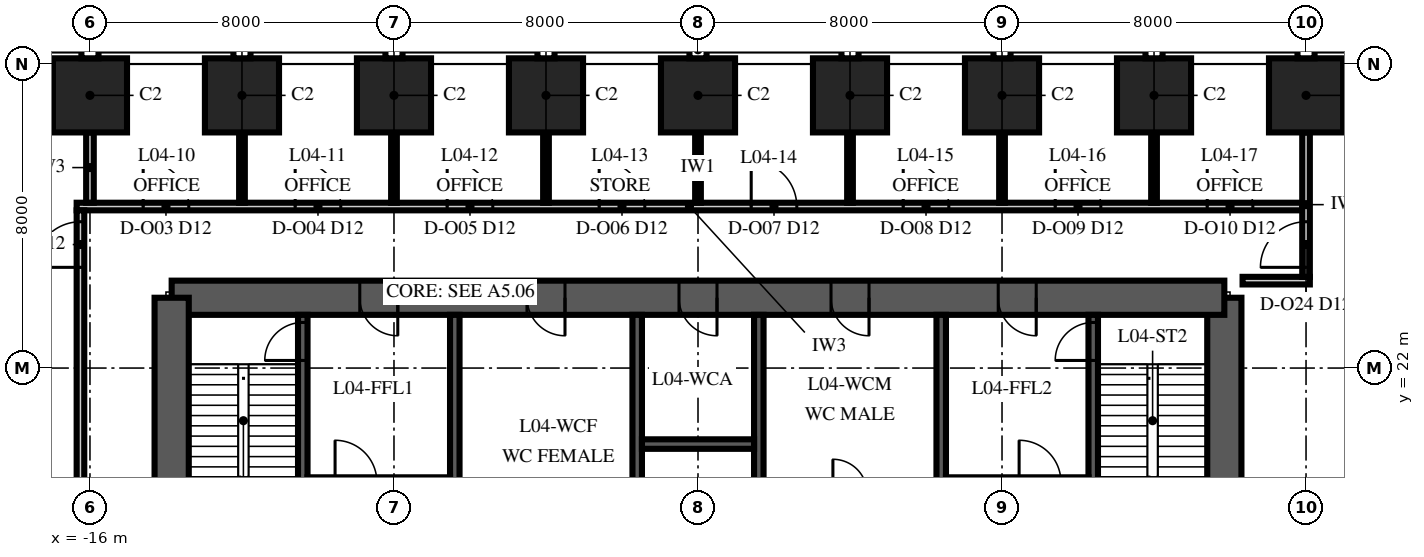
"""IFC4 building model, lengths in metres.
Left out: names, types, materials, properties, quantities, classifications, styles, units other than length and angle.
Written with IfcOpenShell. Run it as: python <this file> out.ifc"""

import sys

from ifc_helpers import new_model, si_unit, direction, frame, frame_2d, origin, origin_2d, place, context, subcontext, project, spatial, polyline, rectangle, outline, extrude, element, fill, save


model = new_model("IFC4")
c1 = context("Model", 3, precision=1e-05, world=origin(), true_north=direction((0.0, 1.0)))
c2 = subcontext(c1, "Body", "Model", "MODEL_VIEW")
j1 = project(units=[si_unit("LENGTHUNIT", "METRE"), si_unit("PLANEANGLEUNIT", "RADIAN")], contexts=[c1])
p1 = place(None, origin())
s1 = spatial("IfcSite", under=j1, at=p1, CompositionType="ELEMENT")
p2 = place(p1, origin())
s2 = spatial("IfcBuilding", under=s1, at=p2, CompositionType="ELEMENT")
p3 = place(p2, frame((0.0, 0.0, 28.0)))
s3 = spatial("IfcBuildingStorey", under=s2, at=p3, CompositionType="ELEMENT", Elevation=28.0)
for number, where, z_axis, x_axis in (
    (1, (16.0, 29.175, 0.0), (0.0, 0.0, 1.0), (-1.0, 0.0, 0.0)),
    (2, (12.0, 29.175, 0.0), (0.0, 0.0, 1.0), (-1.0, 0.0, 0.0)),
    (3, (8.0, 29.175, 0.0), (0.0, 0.0, 1.0), (-1.0, 0.0, 0.0)),
    (4, (4.0, 29.175, 0.0), (0.0, 0.0, 1.0), (-1.0, 0.0, 0.0)),
    (5, (0.0, 29.175, 0.0), (0.0, 0.0, 1.0), (-1.0, 0.0, 0.0)),
    (6, (-4.0, 29.175, 0.0), (0.0, 0.0, 1.0), (-1.0, 0.0, 0.0)),
    (7, (-8.0, 29.175, 0.0), (0.0, 0.0, 1.0), (-1.0, 0.0, 0.0)),
    (8, (-12.0, 29.175, 0.0), (0.0, 0.0, 1.0), (-1.0, 0.0, 0.0)),
    (9, (-16.0, 29.175, 0.0), (0.0, 0.0, 1.0), (-1.0, 0.0, 0.0)),
):
    element("IfcColumn", number, at=place(p3, frame(where, z_axis=z_axis, x_axis=x_axis)), inside=s3, PredefinedType="COLUMN", context=c2, shape_type="SweptSolid", body=[
        extrude(rectangle(XDim=1.95, YDim=1.95, at=origin_2d()), origin(), (0.0, 0.0, 1.0), 4.0),
    ])
p4 = place(p3, frame((13.85, 6.15, 0.0), z_axis=(0.0, 0.0, 1.0), x_axis=(0.0, 1.0, 0.0)))
e10 = element("IfcWall", 10, at=p4, inside=s3, PredefinedType="SHEAR", context=c2, shape_type="SweptSolid", body=[
    extrude(outline(polyline([(0.0, -0.45), (17.7, -0.45), (17.7, 0.0), (17.25, 0.0), (17.25, 0.45), (0.45, 0.45), (0.45, 0.0), (0.0, 0.0), (0.0, -0.45)])), origin(), (0.0, 0.0, 1.0), 4.0),
])
p5 = place(p4, frame((4.15, 0.0, 0.0)))
e11 = element("IfcOpeningElement", 11, at=p5, cuts=e10, PredefinedType="OPENING", context=c2, shape_type="SweptSolid", body=[
    extrude(rectangle(XDim=1.8, YDim=2.4, at=frame_2d((0.9, 1.2))), frame((0.0, 0.465, 0.0), z_axis=(0.0, -1.0, 0.0), x_axis=(1.0, 0.0, 0.0)), (0.0, 0.0, 1.0), 0.93),
])
p6 = place(p3, frame((13.85, 23.85, 0.0), z_axis=(0.0, 0.0, 1.0), x_axis=(-1.0, 0.0, 0.0)))
e12 = element("IfcWall", 12, at=p6, inside=s3, PredefinedType="SHEAR", context=c2, shape_type="SweptSolid", body=[
    extrude(rectangle(XDim=27.7, YDim=0.9, at=frame_2d((13.85, 0.0))), origin(), (0.0, 0.0, 1.0), 4.0),
])
p7 = place(p6, frame((21.75, 0.0, 0.0)))
e13 = element("IfcOpeningElement", 13, at=p7, cuts=e12, PredefinedType="OPENING", context=c2, shape_type="SweptSolid", body=[
    extrude(rectangle(XDim=1.0, YDim=2.1, at=frame_2d((0.5, 1.05))), frame((0.0, 0.465, 0.0), z_axis=(0.0, -1.0, 0.0), x_axis=(1.0, 0.0, 0.0)), (0.0, 0.0, 1.0), 0.93),
])
p8 = place(p6, frame((4.95, 0.0, 0.0)))
e14 = element("IfcOpeningElement", 14, at=p8, cuts=e12, PredefinedType="OPENING", context=c2, shape_type="SweptSolid", body=[
    extrude(rectangle(XDim=1.0, YDim=2.1, at=frame_2d((0.5, 1.05))), frame((0.0, 0.465, 0.0), z_axis=(0.0, -1.0, 0.0), x_axis=(1.0, 0.0, 0.0)), (0.0, 0.0, 1.0), 0.93),
])
p9 = place(p6, frame((17.35, 0.0, 0.0)))
e15 = element("IfcOpeningElement", 15, at=p9, cuts=e12, PredefinedType="OPENING", context=c2, shape_type="SweptSolid", body=[
    extrude(rectangle(XDim=1.0, YDim=2.1, at=frame_2d((0.5, 1.05))), frame((0.0, 0.465, 0.0), z_axis=(0.0, -1.0, 0.0), x_axis=(1.0, 0.0, 0.0)), (0.0, 0.0, 1.0), 0.93),
])
p10 = place(p6, frame((13.35, 0.0, 0.0)))
e16 = element("IfcOpeningElement", 16, at=p10, cuts=e12, PredefinedType="OPENING", context=c2, shape_type="SweptSolid", body=[
    extrude(rectangle(XDim=1.0, YDim=2.1, at=frame_2d((0.5, 1.05))), frame((0.0, 0.465, 0.0), z_axis=(0.0, -1.0, 0.0), x_axis=(1.0, 0.0, 0.0)), (0.0, 0.0, 1.0), 0.93),
])
p11 = place(p6, frame((9.35, 0.0, 0.0)))
e17 = element("IfcOpeningElement", 17, at=p11, cuts=e12, PredefinedType="OPENING", context=c2, shape_type="SweptSolid", body=[
    extrude(rectangle(XDim=1.0, YDim=2.1, at=frame_2d((0.5, 1.05))), frame((0.0, 0.465, 0.0), z_axis=(0.0, -1.0, 0.0), x_axis=(1.0, 0.0, 0.0)), (0.0, 0.0, 1.0), 0.93),
])
p12 = place(p3, frame((-13.85, 23.85, 0.0), z_axis=(0.0, 0.0, 1.0), x_axis=(0.0, -1.0, 0.0)))
e18 = element("IfcWall", 18, at=p12, inside=s3, PredefinedType="SHEAR", context=c2, shape_type="SweptSolid", body=[
    extrude(outline(polyline([(0.0, -0.45), (17.7, -0.45), (17.7, 0.0), (17.25, 0.0), (17.25, 0.45), (0.45, 0.45), (0.45, 0.0), (0.0, 0.0), (0.0, -0.45)])), origin(), (0.0, 0.0, 1.0), 4.0),
])
p13 = place(p12, frame((11.75, 0.0, 0.0)))
e19 = element("IfcOpeningElement", 19, at=p13, cuts=e18, PredefinedType="OPENING", context=c2, shape_type="SweptSolid", body=[
    extrude(rectangle(XDim=1.8, YDim=2.4, at=frame_2d((0.9, 1.2))), frame((0.0, 0.465, 0.0), z_axis=(0.0, -1.0, 0.0), x_axis=(1.0, 0.0, 0.0)), (0.0, 0.0, 1.0), 0.93),
])
p14 = place(p3, frame((-10.4, 16.125, 0.0), z_axis=(0.0, 0.0, 1.0), x_axis=(0.0, 1.0, 0.0)))
e20 = element("IfcWall", 20, at=p14, inside=s3, PredefinedType="SHEAR", context=c2, shape_type="SweptSolid", body=[
    extrude(rectangle(XDim=7.275, YDim=0.25, at=frame_2d((3.637, 0.0))), origin(), (0.0, 0.0, 1.0), 4.0),
])
p15 = place(p14, frame((6.075, 0.0, 0.0)))
e21 = element("IfcOpeningElement", 21, at=p15, cuts=e20, PredefinedType="OPENING", context=c2, shape_type="SweptSolid", body=[
    extrude(rectangle(XDim=1.0, YDim=2.1, at=frame_2d((0.5, 1.05))), frame((0.0, 0.14, 0.0), z_axis=(0.0, -1.0, 0.0), x_axis=(1.0, 0.0, 0.0)), (0.0, 0.0, 1.0), 0.28),
])
for number, where, z_axis, x_axis in (
    (22, (-6.4, 16.125, 0.0), (0.0, 0.0, 1.0), (0.0, 1.0, 0.0)),
    (23, (-1.6, 16.125, 0.0), (0.0, 0.0, 1.0), (0.0, 1.0, 0.0)),
    (24, (1.6, 16.125, 0.0), (0.0, 0.0, 1.0), (0.0, 1.0, 0.0)),
    (25, (6.4, 16.125, 0.0), (0.0, 0.0, 1.0), (0.0, 1.0, 0.0)),
):
    element("IfcWall", number, at=place(p3, frame(where, z_axis=z_axis, x_axis=x_axis)), inside=s3, PredefinedType="SHEAR", context=c2, shape_type="SweptSolid", body=[
        extrude(rectangle(XDim=7.275, YDim=0.25, at=frame_2d((3.637, 0.0))), origin(), (0.0, 0.0, 1.0), 4.0),
    ])
p16 = place(p3, frame((10.4, 16.125, 0.0), z_axis=(0.0, 0.0, 1.0), x_axis=(0.0, 1.0, 0.0)))
e26 = element("IfcWall", 26, at=p16, inside=s3, PredefinedType="SHEAR", context=c2, shape_type="SweptSolid", body=[
    extrude(rectangle(XDim=7.275, YDim=0.25, at=frame_2d((3.637, 0.0))), origin(), (0.0, 0.0, 1.0), 4.0),
])
p17 = place(p16, frame((6.075, 0.0, 0.0)))
e27 = element("IfcOpeningElement", 27, at=p17, cuts=e26, PredefinedType="OPENING", context=c2, shape_type="SweptSolid", body=[
    extrude(rectangle(XDim=1.0, YDim=2.1, at=frame_2d((0.5, 1.05))), frame((0.0, 0.14, 0.0), z_axis=(0.0, -1.0, 0.0), x_axis=(1.0, 0.0, 0.0)), (0.0, 0.0, 1.0), 0.28),
])
p18 = place(p3, frame((-1.475, 20.0, 0.0), z_axis=(0.0, 0.0, 1.0), x_axis=(1.0, 0.0, 0.0)))
e28 = element("IfcWall", 28, at=p18, inside=s3, PredefinedType="SHEAR", context=c2, shape_type="SweptSolid", body=[
    extrude(rectangle(XDim=2.95, YDim=0.25, at=frame_2d((1.475, 0.0))), origin(), (0.0, 0.0, 1.0), 4.0),
])
p19 = place(p3, frame((14.33, 24.3, 0.0), z_axis=(0.0, 0.0, 1.0), x_axis=(1.0, 0.0, 0.0)))
e29 = element("IfcWall", 29, at=p19, inside=s3, PredefinedType="PARTITIONING", context=c2, shape_type="SweptSolid", body=[
    extrude(rectangle(XDim=1.77, YDim=0.2, at=frame_2d((0.885, 0.0))), origin(), (0.0, 0.0, 1.0), 3.4),
])
p20 = place(p3, frame((-16.35, 26.25, 0.0), z_axis=(0.0, 0.0, 1.0), x_axis=(1.0, 0.0, 0.0)))
e30 = element("IfcWall", 30, at=p20, inside=s3, PredefinedType="PARTITIONING", context=c2, shape_type="SweptSolid", body=[
    extrude(rectangle(XDim=32.25, YDim=0.2, at=frame_2d((16.125, 0.0))), origin(), (0.0, 0.0, 1.0), 3.4),
])
p21 = place(p20, frame((1.75, 0.0, 0.0)))
e31 = element("IfcOpeningElement", 31, at=p21, cuts=e30, PredefinedType="OPENING", context=c2, shape_type="SweptSolid", body=[
    extrude(rectangle(XDim=1.2, YDim=2.4, at=frame_2d((0.6, 1.2))), frame((0.0, 0.115, 0.0), z_axis=(0.0, -1.0, 0.0), x_axis=(1.0, 0.0, 0.0)), (0.0, 0.0, 1.0), 0.23),
])
p22 = place(p20, frame((5.75, 0.0, 0.0)))
e32 = element("IfcOpeningElement", 32, at=p22, cuts=e30, PredefinedType="OPENING", context=c2, shape_type="SweptSolid", body=[
    extrude(rectangle(XDim=1.2, YDim=2.4, at=frame_2d((0.6, 1.2))), frame((0.0, 0.115, 0.0), z_axis=(0.0, -1.0, 0.0), x_axis=(1.0, 0.0, 0.0)), (0.0, 0.0, 1.0), 0.23),
])
p23 = place(p20, frame((9.75, 0.0, 0.0)))
e33 = element("IfcOpeningElement", 33, at=p23, cuts=e30, PredefinedType="OPENING", context=c2, shape_type="SweptSolid", body=[
    extrude(rectangle(XDim=1.2, YDim=2.4, at=frame_2d((0.6, 1.2))), frame((0.0, 0.115, 0.0), z_axis=(0.0, -1.0, 0.0), x_axis=(1.0, 0.0, 0.0)), (0.0, 0.0, 1.0), 0.23),
])
p24 = place(p20, frame((13.75, 0.0, 0.0)))
e34 = element("IfcOpeningElement", 34, at=p24, cuts=e30, PredefinedType="OPENING", context=c2, shape_type="SweptSolid", body=[
    extrude(rectangle(XDim=1.2, YDim=2.4, at=frame_2d((0.6, 1.2))), frame((0.0, 0.115, 0.0), z_axis=(0.0, -1.0, 0.0), x_axis=(1.0, 0.0, 0.0)), (0.0, 0.0, 1.0), 0.23),
])
p25 = place(p20, frame((17.75, 0.0, 0.0)))
e35 = element("IfcOpeningElement", 35, at=p25, cuts=e30, PredefinedType="OPENING", context=c2, shape_type="SweptSolid", body=[
    extrude(rectangle(XDim=1.2, YDim=2.4, at=frame_2d((0.6, 1.2))), frame((0.0, 0.115, 0.0), z_axis=(0.0, -1.0, 0.0), x_axis=(1.0, 0.0, 0.0)), (0.0, 0.0, 1.0), 0.23),
])
p26 = place(p20, frame((21.75, 0.0, 0.0)))
e36 = element("IfcOpeningElement", 36, at=p26, cuts=e30, PredefinedType="OPENING", context=c2, shape_type="SweptSolid", body=[
    extrude(rectangle(XDim=1.2, YDim=2.4, at=frame_2d((0.6, 1.2))), frame((0.0, 0.115, 0.0), z_axis=(0.0, -1.0, 0.0), x_axis=(1.0, 0.0, 0.0)), (0.0, 0.0, 1.0), 0.23),
])
p27 = place(p20, frame((25.75, 0.0, 0.0)))
e37 = element("IfcOpeningElement", 37, at=p27, cuts=e30, PredefinedType="OPENING", context=c2, shape_type="SweptSolid", body=[
    extrude(rectangle(XDim=1.2, YDim=2.4, at=frame_2d((0.6, 1.2))), frame((0.0, 0.115, 0.0), z_axis=(0.0, -1.0, 0.0), x_axis=(1.0, 0.0, 0.0)), (0.0, 0.0, 1.0), 0.23),
])
p28 = place(p20, frame((29.75, 0.0, 0.0)))
e38 = element("IfcOpeningElement", 38, at=p28, cuts=e30, PredefinedType="OPENING", context=c2, shape_type="SweptSolid", body=[
    extrude(rectangle(XDim=1.2, YDim=2.4, at=frame_2d((0.6, 1.2))), frame((0.0, 0.115, 0.0), z_axis=(0.0, -1.0, 0.0), x_axis=(1.0, 0.0, 0.0)), (0.0, 0.0, 1.0), 0.23),
])
p29 = place(p3, frame((-16.25, 9.9, 0.0), z_axis=(0.0, 0.0, 1.0), x_axis=(0.0, 1.0, 0.0)))
e39 = element("IfcWall", 39, at=p29, inside=s3, PredefinedType="PARTITIONING", context=c2, shape_type="SweptSolid", body=[
    extrude(rectangle(XDim=16.25, YDim=0.2, at=frame_2d((8.125, 0.0))), origin(), (0.0, 0.0, 1.0), 3.25),
])
p30 = place(p29, frame((14.75, 0.0, 0.0)))
e40 = element("IfcOpeningElement", 40, at=p30, cuts=e39, PredefinedType="OPENING", context=c2, shape_type="SweptSolid", body=[
    extrude(rectangle(XDim=1.2, YDim=2.4, at=frame_2d((0.6, 1.2))), frame((0.0, 0.115, 0.0), z_axis=(0.0, -1.0, 0.0), x_axis=(1.0, 0.0, 0.0)), (0.0, 0.0, 1.0), 0.23),
])
p31 = place(p3, frame((-16.0, 26.35, 0.0), z_axis=(0.0, 0.0, 1.0), x_axis=(0.0, 1.0, 0.0)))
e41 = element("IfcWall", 41, at=p31, inside=s3, PredefinedType="PARTITIONING", context=c2, shape_type="SweptSolid", body=[
    extrude(rectangle(XDim=1.85, YDim=0.2, at=frame_2d((0.925, 0.0))), origin(), (0.0, 0.0, 1.0), 3.4),
])
p32 = place(p3, frame((-12.0, 26.35, 0.0), z_axis=(0.0, 0.0, 1.0), x_axis=(0.0, 1.0, 0.0)))
e42 = element("IfcWall", 42, at=p32, inside=s3, PredefinedType="PARTITIONING", context=c2, shape_type="SweptSolid", body=[
    extrude(rectangle(XDim=1.85, YDim=0.15, at=frame_2d((0.925, 0.0))), origin(), (0.0, 0.0, 1.0), 3.85),
])
p33 = place(p3, frame((-8.0, 26.35, 0.0), z_axis=(0.0, 0.0, 1.0), x_axis=(0.0, 1.0, 0.0)))
e43 = element("IfcWall", 43, at=p33, inside=s3, PredefinedType="PARTITIONING", context=c2, shape_type="SweptSolid", body=[
    extrude(rectangle(XDim=1.85, YDim=0.15, at=frame_2d((0.925, 0.0))), origin(), (0.0, 0.0, 1.0), 3.4),
])
p34 = place(p3, frame((-4.0, 26.35, 0.0), z_axis=(0.0, 0.0, 1.0), x_axis=(0.0, 1.0, 0.0)))
e44 = element("IfcWall", 44, at=p34, inside=s3, PredefinedType="PARTITIONING", context=c2, shape_type="SweptSolid", body=[
    extrude(rectangle(XDim=1.85, YDim=0.15, at=frame_2d((0.925, 0.0))), origin(), (0.0, 0.0, 1.0), 3.85),
])
p35 = place(p3, frame((0.0, 26.35, 0.0), z_axis=(0.0, 0.0, 1.0), x_axis=(0.0, 1.0, 0.0)))
e45 = element("IfcWall", 45, at=p35, inside=s3, PredefinedType="PARTITIONING", context=c2, shape_type="SweptSolid", body=[
    extrude(rectangle(XDim=1.85, YDim=0.15, at=frame_2d((0.925, 0.0))), origin(), (0.0, 0.0, 1.0), 3.4),
])
p36 = place(p3, frame((4.0, 26.35, 0.0), z_axis=(0.0, 0.0, 1.0), x_axis=(0.0, 1.0, 0.0)))
e46 = element("IfcWall", 46, at=p36, inside=s3, PredefinedType="PARTITIONING", context=c2, shape_type="SweptSolid", body=[
    extrude(rectangle(XDim=1.85, YDim=0.15, at=frame_2d((0.925, 0.0))), origin(), (0.0, 0.0, 1.0), 3.85),
])
p37 = place(p3, frame((8.0, 26.35, 0.0), z_axis=(0.0, 0.0, 1.0), x_axis=(0.0, 1.0, 0.0)))
e47 = element("IfcWall", 47, at=p37, inside=s3, PredefinedType="PARTITIONING", context=c2, shape_type="SweptSolid", body=[
    extrude(rectangle(XDim=1.85, YDim=0.15, at=frame_2d((0.925, 0.0))), origin(), (0.0, 0.0, 1.0), 3.4),
])
p38 = place(p3, frame((12.0, 26.35, 0.0), z_axis=(0.0, 0.0, 1.0), x_axis=(0.0, 1.0, 0.0)))
e48 = element("IfcWall", 48, at=p38, inside=s3, PredefinedType="PARTITIONING", context=c2, shape_type="SweptSolid", body=[
    extrude(rectangle(XDim=1.85, YDim=0.15, at=frame_2d((0.925, 0.0))), origin(), (0.0, 0.0, 1.0), 3.85),
])
p39 = place(p3, frame((16.0, 24.4, 0.0), z_axis=(0.0, 0.0, 1.0), x_axis=(0.0, 1.0, 0.0)))
e49 = element("IfcWall", 49, at=p39, inside=s3, PredefinedType="PARTITIONING", context=c2, shape_type="SweptSolid", body=[
    extrude(rectangle(XDim=3.8, YDim=0.2, at=frame_2d((1.9, 0.0))), origin(), (0.0, 0.0, 1.0), 3.4),
])
p40 = place(p39, frame((0.25, 0.0, 0.0)))
e50 = element("IfcOpeningElement", 50, at=p40, cuts=e49, PredefinedType="OPENING", context=c2, shape_type="SweptSolid", body=[
    extrude(rectangle(XDim=1.2, YDim=2.4, at=frame_2d((0.6, 1.2))), frame((0.0, 0.115, 0.0), z_axis=(0.0, -1.0, 0.0), x_axis=(1.0, 0.0, 0.0)), (0.0, 0.0, 1.0), 0.23),
])
p41 = place(p7, origin())
e51 = element("IfcDoor", 51, at=p41, inside=s3, OperationType="SINGLE_SWING_RIGHT", PredefinedType="DOOR", context=c2, shape_type="SweptSolid", body=[
    extrude(rectangle(XDim=1.0, YDim=2.1, at=frame_2d((0.5, 1.05))), frame((0.0, 0.45, 0.0), z_axis=(0.0, -1.0, 0.0), x_axis=(1.0, 0.0, 0.0)), (0.0, 0.0, 1.0), 0.899),
])
fill(e13, e51)
p42 = place(p8, origin())
e52 = element("IfcDoor", 52, at=p42, inside=s3, OperationType="SINGLE_SWING_RIGHT", PredefinedType="DOOR", context=c2, shape_type="SweptSolid", body=[
    extrude(rectangle(XDim=1.0, YDim=2.1, at=frame_2d((0.5, 1.05))), frame((0.0, 0.45, 0.0), z_axis=(0.0, -1.0, 0.0), x_axis=(1.0, 0.0, 0.0)), (0.0, 0.0, 1.0), 0.899),
])
fill(e14, e52)
p43 = place(p9, origin())
e53 = element("IfcDoor", 53, at=p43, inside=s3, OperationType="SINGLE_SWING_LEFT", PredefinedType="DOOR", context=c2, shape_type="SweptSolid", body=[
    extrude(rectangle(XDim=1.0, YDim=2.1, at=frame_2d((0.5, 1.05))), frame((0.0, 0.45, 0.0), z_axis=(0.0, -1.0, 0.0), x_axis=(1.0, 0.0, 0.0)), (0.0, 0.0, 1.0), 0.899),
])
fill(e15, e53)
p44 = place(p10, origin())
e54 = element("IfcDoor", 54, at=p44, inside=s3, OperationType="SINGLE_SWING_LEFT", PredefinedType="DOOR", context=c2, shape_type="SweptSolid", body=[
    extrude(rectangle(XDim=1.0, YDim=2.1, at=frame_2d((0.5, 1.05))), frame((0.0, 0.45, 0.0), z_axis=(0.0, -1.0, 0.0), x_axis=(1.0, 0.0, 0.0)), (0.0, 0.0, 1.0), 0.899),
])
fill(e16, e54)
p45 = place(p11, origin())
e55 = element("IfcDoor", 55, at=p45, inside=s3, OperationType="SINGLE_SWING_LEFT", PredefinedType="DOOR", context=c2, shape_type="SweptSolid", body=[
    extrude(rectangle(XDim=1.0, YDim=2.1, at=frame_2d((0.5, 1.05))), frame((0.0, 0.45, 0.0), z_axis=(0.0, -1.0, 0.0), x_axis=(1.0, 0.0, 0.0)), (0.0, 0.0, 1.0), 0.899),
])
fill(e17, e55)
p46 = place(p15, origin())
e56 = element("IfcDoor", 56, at=p46, inside=s3, OperationType="SINGLE_SWING_LEFT", PredefinedType="DOOR", context=c2, shape_type="SweptSolid", body=[
    extrude(rectangle(XDim=1.0, YDim=2.1, at=frame_2d((0.5, 1.05))), frame((0.0, 0.125, 0.0), z_axis=(0.0, -1.0, 0.0), x_axis=(1.0, 0.0, 0.0)), (0.0, 0.0, 1.0), 0.25),
])
fill(e21, e56)
p47 = place(p17, origin())
e57 = element("IfcDoor", 57, at=p47, inside=s3, OperationType="SINGLE_SWING_LEFT", PredefinedType="DOOR", context=c2, shape_type="SweptSolid", body=[
    extrude(rectangle(XDim=1.0, YDim=2.1, at=frame_2d((0.5, 1.05))), frame((0.0, 0.125, 0.0), z_axis=(0.0, -1.0, 0.0), x_axis=(1.0, 0.0, 0.0)), (0.0, 0.0, 1.0), 0.25),
])
fill(e27, e57)
p48 = place(p21, origin())
e58 = element("IfcDoor", 58, at=p48, inside=s3, OperationType="SINGLE_SWING_LEFT", PredefinedType="DOOR", context=c2, shape_type="SweptSolid", body=[
    extrude(rectangle(XDim=1.2, YDim=2.4, at=frame_2d((0.6, 1.2))), frame((0.0, 0.1, 0.0), z_axis=(0.0, -1.0, 0.0), x_axis=(1.0, 0.0, 0.0)), (0.0, 0.0, 1.0), 0.199),
])
fill(e31, e58)
p49 = place(p22, origin())
e59 = element("IfcDoor", 59, at=p49, inside=s3, OperationType="SINGLE_SWING_LEFT", PredefinedType="DOOR", context=c2, shape_type="SweptSolid", body=[
    extrude(rectangle(XDim=1.2, YDim=2.4, at=frame_2d((0.6, 1.2))), frame((0.0, 0.1, 0.0), z_axis=(0.0, -1.0, 0.0), x_axis=(1.0, 0.0, 0.0)), (0.0, 0.0, 1.0), 0.199),
])
fill(e32, e59)
p50 = place(p23, origin())
e60 = element("IfcDoor", 60, at=p50, inside=s3, OperationType="SINGLE_SWING_LEFT", PredefinedType="DOOR", context=c2, shape_type="SweptSolid", body=[
    extrude(rectangle(XDim=1.2, YDim=2.4, at=frame_2d((0.6, 1.2))), frame((0.0, 0.1, 0.0), z_axis=(0.0, -1.0, 0.0), x_axis=(1.0, 0.0, 0.0)), (0.0, 0.0, 1.0), 0.199),
])
fill(e33, e60)
p51 = place(p24, origin())
e61 = element("IfcDoor", 61, at=p51, inside=s3, OperationType="SINGLE_SWING_LEFT", PredefinedType="DOOR", context=c2, shape_type="SweptSolid", body=[
    extrude(rectangle(XDim=1.2, YDim=2.4, at=frame_2d((0.6, 1.2))), frame((0.0, 0.1, 0.0), z_axis=(0.0, -1.0, 0.0), x_axis=(1.0, 0.0, 0.0)), (0.0, 0.0, 1.0), 0.199),
])
fill(e34, e61)
p52 = place(p25, origin())
e62 = element("IfcDoor", 62, at=p52, inside=s3, OperationType="SINGLE_SWING_LEFT", PredefinedType="DOOR", context=c2, shape_type="SweptSolid", body=[
    extrude(rectangle(XDim=1.2, YDim=2.4, at=frame_2d((0.6, 1.2))), frame((0.0, 0.1, 0.0), z_axis=(0.0, -1.0, 0.0), x_axis=(1.0, 0.0, 0.0)), (0.0, 0.0, 1.0), 0.199),
])
fill(e35, e62)
p53 = place(p26, origin())
e63 = element("IfcDoor", 63, at=p53, inside=s3, OperationType="SINGLE_SWING_LEFT", PredefinedType="DOOR", context=c2, shape_type="SweptSolid", body=[
    extrude(rectangle(XDim=1.2, YDim=2.4, at=frame_2d((0.6, 1.2))), frame((0.0, 0.1, 0.0), z_axis=(0.0, -1.0, 0.0), x_axis=(1.0, 0.0, 0.0)), (0.0, 0.0, 1.0), 0.199),
])
fill(e36, e63)
p54 = place(p27, origin())
e64 = element("IfcDoor", 64, at=p54, inside=s3, OperationType="SINGLE_SWING_LEFT", PredefinedType="DOOR", context=c2, shape_type="SweptSolid", body=[
    extrude(rectangle(XDim=1.2, YDim=2.4, at=frame_2d((0.6, 1.2))), frame((0.0, 0.1, 0.0), z_axis=(0.0, -1.0, 0.0), x_axis=(1.0, 0.0, 0.0)), (0.0, 0.0, 1.0), 0.199),
])
fill(e37, e64)
p55 = place(p28, origin())
e65 = element("IfcDoor", 65, at=p55, inside=s3, OperationType="SINGLE_SWING_LEFT", PredefinedType="DOOR", context=c2, shape_type="SweptSolid", body=[
    extrude(rectangle(XDim=1.2, YDim=2.4, at=frame_2d((0.6, 1.2))), frame((0.0, 0.1, 0.0), z_axis=(0.0, -1.0, 0.0), x_axis=(1.0, 0.0, 0.0)), (0.0, 0.0, 1.0), 0.199),
])
fill(e38, e65)
p56 = place(p30, origin())
e66 = element("IfcDoor", 66, at=p56, inside=s3, OperationType="SINGLE_SWING_LEFT", PredefinedType="DOOR", context=c2, shape_type="SweptSolid", body=[
    extrude(rectangle(XDim=1.2, YDim=2.4, at=frame_2d((0.6, 1.2))), frame((0.0, 0.1, 0.0), z_axis=(0.0, -1.0, 0.0), x_axis=(1.0, 0.0, 0.0)), (0.0, 0.0, 1.0), 0.199),
])
fill(e40, e66)
p57 = place(p40, origin())
e67 = element("IfcDoor", 67, at=p57, inside=s3, OperationType="SINGLE_SWING_LEFT", PredefinedType="DOOR", context=c2, shape_type="SweptSolid", body=[
    extrude(rectangle(XDim=1.2, YDim=2.4, at=frame_2d((0.6, 1.2))), frame((0.0, 0.1, 0.0), z_axis=(0.0, -1.0, 0.0), x_axis=(1.0, 0.0, 0.0)), (0.0, 0.0, 1.0), 0.199),
])
fill(e50, e67)
save(model, sys.argv[1])
